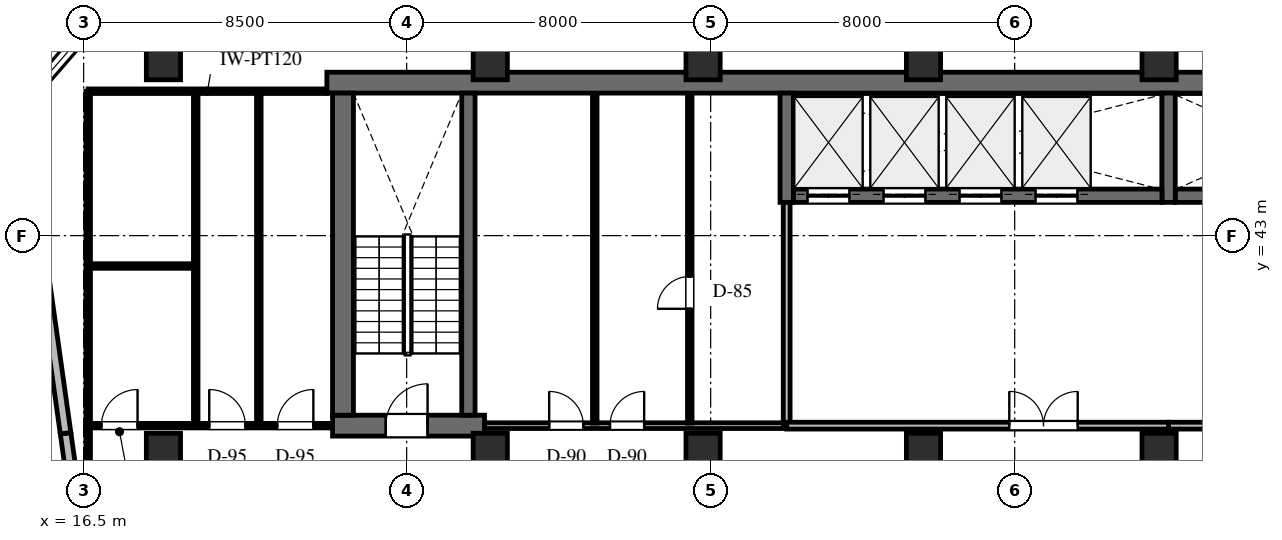
"""IFC4 building model, lengths in metres.
Left out: names, types, materials, properties, quantities, classifications, styles, units other than length and angle.
Written with IfcOpenShell. Run it as: python <this file> out.ifc"""

import sys

from ifc_helpers import new_model, si_unit, direction, frame, frame_2d, origin, origin_2d, place, context, subcontext, project, spatial, rectangle, extrude, element, fill, save


model = new_model("IFC4")
c1 = context("Model", 3, precision=1e-05, world=origin(), true_north=direction((0.0, 1.0)))
c2 = subcontext(c1, "Body", "Model", "MODEL_VIEW")
j1 = project(units=[si_unit("LENGTHUNIT", "METRE"), si_unit("PLANEANGLEUNIT", "RADIAN")], contexts=[c1])
p1 = place(None, origin())
s1 = spatial("IfcSite", under=j1, at=p1, CompositionType="ELEMENT")
p2 = place(p1, origin())
s2 = spatial("IfcBuilding", under=s1, at=p2, CompositionType="ELEMENT")
p3 = place(p2, frame((0.0, 0.0, 192.5)))
s3 = spatial("IfcBuildingStorey", under=s2, at=p3, CompositionType="ELEMENT", Elevation=192.5)
p4 = place(p3, frame((22.9, 47.025, 0.0), z_axis=(0.0, 0.0, 1.0), x_axis=(1.0, 0.0, 0.0)))
e1 = element("IfcWall", 1, at=p4, inside=s3, PredefinedType="SHEAR", context=c2, shape_type="SweptSolid", body=[
    extrude(rectangle(XDim=43.5, YDim=0.55, at=frame_2d((21.75, 0.0))), origin(), (0.0, 0.0, 1.0), 4.0),
])
p5 = place(p3, frame((45.225, 44.05, 0.0), z_axis=(0.0, 0.0, 1.0), x_axis=(1.0, 0.0, 0.0)))
e2 = element("IfcWall", 2, at=p5, inside=s3, PredefinedType="SHEAR", context=c2, shape_type="SweptSolid", body=[
    extrude(rectangle(XDim=5.65, YDim=0.35, at=frame_2d((2.825, 0.0))), origin(), (0.0, 0.0, 1.0), 4.0),
])
p6 = place(p3, frame((45.05, 43.875, 0.0), z_axis=(0.0, 0.0, 1.0), x_axis=(0.0, 1.0, 0.0)))
e3 = element("IfcWall", 3, at=p6, inside=s3, PredefinedType="SHEAR", context=c2, shape_type="SweptSolid", body=[
    extrude(rectangle(XDim=2.875, YDim=0.35, at=frame_2d((1.438, 0.0))), origin(), (0.0, 0.0, 1.0), 4.0),
])
p7 = place(p3, frame((35.175, 44.05, 0.0), z_axis=(0.0, 0.0, 1.0), x_axis=(1.0, 0.0, 0.0)))
e4 = element("IfcWall", 4, at=p7, inside=s3, PredefinedType="SHEAR", context=c2, shape_type="SweptSolid", body=[
    extrude(rectangle(XDim=9.7, YDim=0.35, at=frame_2d((4.85, 0.0))), origin(), (0.0, 0.0, 1.0), 4.0),
])
p8 = place(p7, frame((0.375, 0.0, 0.0)))
e5 = element("IfcOpeningElement", 5, at=p8, cuts=e4, PredefinedType="OPENING", context=c2, shape_type="SweptSolid", body=[
    extrude(rectangle(XDim=1.1, YDim=2.2, at=frame_2d((0.55, 1.1))), frame((0.0, 0.185, 0.0), z_axis=(0.0, -1.0, 0.0), x_axis=(1.0, 0.0, 0.0)), (0.0, 0.0, 1.0), 0.37),
])
p9 = place(p7, frame((2.375, 0.0, 0.0)))
e6 = element("IfcOpeningElement", 6, at=p9, cuts=e4, PredefinedType="OPENING", context=c2, shape_type="SweptSolid", body=[
    extrude(rectangle(XDim=1.1, YDim=2.2, at=frame_2d((0.55, 1.1))), frame((0.0, 0.185, 0.0), z_axis=(0.0, -1.0, 0.0), x_axis=(1.0, 0.0, 0.0)), (0.0, 0.0, 1.0), 0.37),
])
p10 = place(p7, frame((4.375, 0.0, 0.0)))
e7 = element("IfcOpeningElement", 7, at=p10, cuts=e4, PredefinedType="OPENING", context=c2, shape_type="SweptSolid", body=[
    extrude(rectangle(XDim=1.1, YDim=2.2, at=frame_2d((0.55, 1.1))), frame((0.0, 0.185, 0.0), z_axis=(0.0, -1.0, 0.0), x_axis=(1.0, 0.0, 0.0)), (0.0, 0.0, 1.0), 0.37),
])
p11 = place(p7, frame((6.375, 0.0, 0.0)))
e8 = element("IfcOpeningElement", 8, at=p11, cuts=e4, PredefinedType="OPENING", context=c2, shape_type="SweptSolid", body=[
    extrude(rectangle(XDim=1.1, YDim=2.2, at=frame_2d((0.55, 1.1))), frame((0.0, 0.185, 0.0), z_axis=(0.0, -1.0, 0.0), x_axis=(1.0, 0.0, 0.0)), (0.0, 0.0, 1.0), 0.37),
])
p12 = place(p3, frame((35.0, 43.875, 0.0), z_axis=(0.0, 0.0, 1.0), x_axis=(0.0, 1.0, 0.0)))
e9 = element("IfcWall", 9, at=p12, inside=s3, PredefinedType="SHEAR", context=c2, shape_type="SweptSolid", body=[
    extrude(rectangle(XDim=2.875, YDim=0.35, at=frame_2d((1.438, 0.0))), origin(), (0.0, 0.0, 1.0), 4.0),
])
p13 = place(p3, frame((23.05, 38.0, 0.0), z_axis=(0.0, 0.0, 1.0), x_axis=(1.0, 0.0, 0.0)))
e10 = element("IfcWall", 10, at=p13, inside=s3, PredefinedType="SHEAR", context=c2, shape_type="SweptSolid", body=[
    extrude(rectangle(XDim=4.0, YDim=0.55, at=frame_2d((2.0, 0.0))), origin(), (0.0, 0.0, 1.0), 4.0),
])
p14 = place(p13, frame((1.4, 0.0, 0.0)))
e11 = element("IfcOpeningElement", 11, at=p14, cuts=e10, PredefinedType="OPENING", context=c2, shape_type="SweptSolid", body=[
    extrude(rectangle(XDim=1.1, YDim=2.2, at=frame_2d((0.55, 1.1))), frame((0.0, 0.285, 0.0), z_axis=(0.0, -1.0, 0.0), x_axis=(1.0, 0.0, 0.0)), (0.0, 0.0, 1.0), 0.57),
])
p15 = place(p3, frame((23.325, 38.275, 0.0), z_axis=(0.0, 0.0, 1.0), x_axis=(0.0, 1.0, 0.0)))
e12 = element("IfcWall", 12, at=p15, inside=s3, PredefinedType="SHEAR", context=c2, shape_type="SweptSolid", body=[
    extrude(rectangle(XDim=8.475, YDim=0.55, at=frame_2d((4.238, 0.0))), origin(), (0.0, 0.0, 1.0), 4.0),
])
p16 = place(p3, frame((26.625, 38.275, 0.0), z_axis=(0.0, 0.0, 1.0), x_axis=(0.0, 1.0, 0.0)))
e13 = element("IfcWall", 13, at=p16, inside=s3, PredefinedType="SHEAR", context=c2, shape_type="SweptSolid", body=[
    extrude(rectangle(XDim=8.475, YDim=0.35, at=frame_2d((4.238, 0.0))), origin(), (0.0, 0.0, 1.0), 4.0),
])
for number, where, z_axis, x_axis in (
    (14, (44.8, 37.35, 0.0), (0.0, 0.0, 1.0), (1.0, 0.0, 0.0)),
    (15, (44.8, 47.55, 0.0), (0.0, 0.0, 1.0), (1.0, 0.0, 0.0)),
    (16, (38.6, 37.35, 0.0), (0.0, 0.0, 1.0), (1.0, 0.0, 0.0)),
    (17, (38.6, 47.55, 0.0), (0.0, 0.0, 1.0), (1.0, 0.0, 0.0)),
    (18, (32.8, 37.35, 0.0), (0.0, 0.0, 1.0), (1.0, 0.0, 0.0)),
    (19, (32.8, 47.55, 0.0), (0.0, 0.0, 1.0), (1.0, 0.0, 0.0)),
    (20, (27.2, 37.35, 0.0), (0.0, 0.0, 1.0), (1.0, 0.0, 0.0)),
    (21, (27.2, 47.55, 0.0), (0.0, 0.0, 1.0), (1.0, 0.0, 0.0)),
    (22, (18.6, 37.35, 0.0), (0.0, 0.0, 1.0), (1.0, 0.0, 0.0)),
    (23, (18.6, 47.55, 0.0), (0.0, 0.0, 1.0), (1.0, 0.0, 0.0)),
):
    element("IfcColumn", number, at=place(p3, frame(where, z_axis=z_axis, x_axis=x_axis)), inside=s3, PredefinedType="COLUMN", context=c2, shape_type="SweptSolid", body=[
        extrude(rectangle(XDim=0.9, YDim=0.9, at=origin_2d()), origin(), (0.0, 0.0, 1.0), 4.0),
    ])
p17 = place(p3, frame((19.434, 13.541, 0.0), z_axis=(0.0, 0.0, 1.0), x_axis=(-0.139173290738, 0.99026804207, 0.0)))
e24 = element("IfcWall", 24, at=p17, inside=s3, PredefinedType="STANDARD", context=c2, shape_type="SweptSolid", body=[
    extrude(rectangle(XDim=24.498, YDim=0.28, at=frame_2d((12.249, 0.0))), origin(), (0.0, 0.0, 1.0), 3.755),
])
p18 = place(p17, frame((15.668, 0.0, 0.0)))
e25 = element("IfcOpeningElement", 25, at=p18, cuts=e24, PredefinedType="OPENING", context=c2, shape_type="SweptSolid", body=[
    extrude(rectangle(XDim=1.0, YDim=2.15, at=frame_2d((0.5, 1.075))), frame((0.0, 0.15, 0.0), z_axis=(0.0, -1.0, 0.0), x_axis=(1.0, 0.0, 0.0)), (0.0, 0.0, 1.0), 0.3),
])
p19 = place(p17, frame((6.885, 0.0, 0.65)))
e26 = element("IfcOpeningElement", 26, at=p19, cuts=e24, PredefinedType="OPENING", context=c2, shape_type="SweptSolid", body=[
    extrude(rectangle(XDim=1.8, YDim=2.1, at=frame_2d((0.9, 1.05))), frame((0.0, 0.15, 0.0), z_axis=(0.0, -1.0, 0.0), x_axis=(1.0, 0.0, 0.0)), (0.0, 0.0, 1.0), 0.3),
])
p20 = place(p17, frame((18.708, 0.0, 0.65)))
e27 = element("IfcOpeningElement", 27, at=p20, cuts=e24, PredefinedType="OPENING", context=c2, shape_type="SweptSolid", body=[
    extrude(rectangle(XDim=1.8, YDim=2.1, at=frame_2d((0.9, 1.05))), frame((0.0, 0.15, 0.0), z_axis=(0.0, -1.0, 0.0), x_axis=(1.0, 0.0, 0.0)), (0.0, 0.0, 1.0), 0.3),
])
p21 = place(p3, frame((16.025, 37.8, 0.0), z_axis=(0.0, 0.0, 1.0), x_axis=(-0.13918102754, 0.990266954701, 0.0)))
e28 = element("IfcWall", 28, at=p21, inside=s3, PredefinedType="STANDARD", context=c2, shape_type="SweptSolid", body=[
    extrude(rectangle(XDim=8.667, YDim=0.28, at=frame_2d((4.333, 0.0))), origin(), (0.0, 0.0, 1.0), 3.755),
])
p22 = place(p21, frame((3.374, 0.0, 0.65)))
e29 = element("IfcOpeningElement", 29, at=p22, cuts=e28, PredefinedType="OPENING", context=c2, shape_type="SweptSolid", body=[
    extrude(rectangle(XDim=1.8, YDim=2.1, at=frame_2d((0.9, 1.05))), frame((0.0, 0.15, 0.0), z_axis=(0.0, -1.0, 0.0), x_axis=(1.0, 0.0, 0.0)), (0.0, 0.0, 1.0), 0.3),
])
p23 = place(p3, frame((14.819, 46.383, 0.0), z_axis=(0.0, 0.0, 1.0), x_axis=(0.656071351282, 0.754698868442, 0.0)))
e30 = element("IfcWall", 30, at=p23, inside=s3, PredefinedType="STANDARD", context=c2, shape_type="SweptSolid", body=[
    extrude(rectangle(XDim=2.646, YDim=0.28, at=frame_2d((1.323, 0.0))), origin(), (0.0, 0.0, 1.0), 3.755),
])
p24 = place(p23, frame((0.416, 0.0, 0.65)))
e31 = element("IfcOpeningElement", 31, at=p24, cuts=e30, PredefinedType="OPENING", context=c2, shape_type="SweptSolid", body=[
    extrude(rectangle(XDim=1.8, YDim=2.1, at=frame_2d((0.9, 1.05))), frame((0.0, 0.15, 0.0), z_axis=(0.0, -1.0, 0.0), x_axis=(1.0, 0.0, 0.0)), (0.0, 0.0, 1.0), 0.3),
])
p25 = place(p3, frame((45.05, 38.0, 0.0), z_axis=(0.0, 0.0, 1.0), x_axis=(1.0, 0.0, 0.0)))
e32 = element("IfcWall", 32, at=p25, inside=s3, PredefinedType="STANDARD", context=c2, shape_type="SweptSolid", body=[
    extrude(rectangle(XDim=5.75, YDim=0.18, at=frame_2d((2.875, 0.0))), origin(), (0.0, 0.0, 1.0), 2.982),
])
p26 = place(p25, frame((1.325, 0.0, 0.0)))
e33 = element("IfcOpeningElement", 33, at=p26, cuts=e32, PredefinedType="OPENING", context=c2, shape_type="SweptSolid", body=[
    extrude(rectangle(XDim=1.0, YDim=2.15, at=frame_2d((0.5, 1.075))), frame((0.0, 0.1, 0.0), z_axis=(0.0, -1.0, 0.0), x_axis=(1.0, 0.0, 0.0)), (0.0, 0.0, 1.0), 0.2),
])
p27 = place(p25, frame((3.275, 0.0, 0.0)))
e34 = element("IfcOpeningElement", 34, at=p27, cuts=e32, PredefinedType="OPENING", context=c2, shape_type="SweptSolid", body=[
    extrude(rectangle(XDim=1.0, YDim=2.15, at=frame_2d((0.5, 1.075))), frame((0.0, 0.1, 0.0), z_axis=(0.0, -1.0, 0.0), x_axis=(1.0, 0.0, 0.0)), (0.0, 0.0, 1.0), 0.2),
])
p28 = place(p3, frame((27.05, 38.0, 0.0), z_axis=(0.0, 0.0, 1.0), x_axis=(1.0, 0.0, 0.0)))
e35 = element("IfcWall", 35, at=p28, inside=s3, PredefinedType="PARTITIONING", context=c2, shape_type="SweptSolid", body=[
    extrude(rectangle(XDim=7.95, YDim=0.15, at=frame_2d((3.975, 0.0))), origin(), (0.0, 0.0, 1.0), 2.982),
])
p29 = place(p28, frame((1.7, 0.0, 0.0)))
e36 = element("IfcOpeningElement", 36, at=p29, cuts=e35, PredefinedType="OPENING", context=c2, shape_type="SweptSolid", body=[
    extrude(rectangle(XDim=0.9, YDim=2.1, at=frame_2d((0.45, 1.05))), frame((0.0, 0.085, 0.0), z_axis=(0.0, -1.0, 0.0), x_axis=(1.0, 0.0, 0.0)), (0.0, 0.0, 1.0), 0.17),
])
p30 = place(p28, frame((3.3, 0.0, 0.0)))
e37 = element("IfcOpeningElement", 37, at=p30, cuts=e35, PredefinedType="OPENING", context=c2, shape_type="SweptSolid", body=[
    extrude(rectangle(XDim=0.9, YDim=2.1, at=frame_2d((0.45, 1.05))), frame((0.0, 0.085, 0.0), z_axis=(0.0, -1.0, 0.0), x_axis=(1.0, 0.0, 0.0)), (0.0, 0.0, 1.0), 0.17),
])
p31 = place(p3, frame((35.0, 38.0, 0.0), z_axis=(0.0, 0.0, 1.0), x_axis=(0.0, 1.0, 0.0)))
e38 = element("IfcWall", 38, at=p31, inside=s3, PredefinedType="STANDARD", context=c2, shape_type="SweptSolid", body=[
    extrude(rectangle(XDim=5.875, YDim=0.18, at=frame_2d((2.938, 0.0))), origin(), (0.0, 0.0, 1.0), 3.755),
])
p32 = place(p3, frame((29.95, 38.068, 0.0), z_axis=(0.0, 0.0, 1.0), x_axis=(0.0, 1.0, 0.0)))
e39 = element("IfcWall", 39, at=p32, inside=s3, PredefinedType="PARTITIONING", context=c2, shape_type="SweptSolid", body=[
    extrude(rectangle(XDim=8.674, YDim=0.12, at=frame_2d((4.337, 0.0))), origin(), (0.0, 0.0, 1.0), 3.755),
])
p33 = place(p3, frame((32.45, 38.068, 0.0), z_axis=(0.0, 0.0, 1.0), x_axis=(0.0, 1.0, 0.0)))
e40 = element("IfcWall", 40, at=p33, inside=s3, PredefinedType="PARTITIONING", context=c2, shape_type="SweptSolid", body=[
    extrude(rectangle(XDim=8.674, YDim=0.12, at=frame_2d((4.337, 0.0))), origin(), (0.0, 0.0, 1.0), 3.755),
])
p34 = place(p33, frame((3.007, 0.0, 0.0)))
e41 = element("IfcOpeningElement", 41, at=p34, cuts=e40, PredefinedType="OPENING", context=c2, shape_type="SweptSolid", body=[
    extrude(rectangle(XDim=0.85, YDim=2.1, at=frame_2d((0.425, 1.05))), frame((0.0, 0.07, 0.0), z_axis=(0.0, -1.0, 0.0), x_axis=(1.0, 0.0, 0.0)), (0.0, 0.0, 1.0), 0.14),
])
p35 = place(p3, frame((35.0, 38.0, 0.0), z_axis=(0.0, 0.0, 1.0), x_axis=(1.0, 0.0, 0.0)))
e42 = element("IfcWall", 42, at=p35, inside=s3, PredefinedType="STANDARD", context=c2, shape_type="SweptSolid", body=[
    extrude(rectangle(XDim=10.05, YDim=0.18, at=frame_2d((5.025, 0.0))), origin(), (0.0, 0.0, 1.0), 2.982),
])
p36 = place(p35, frame((5.858, 0.0, 0.0)))
e43 = element("IfcOpeningElement", 43, at=p36, cuts=e42, PredefinedType="OPENING", context=c2, shape_type="SweptSolid", body=[
    extrude(rectangle(XDim=1.8, YDim=2.2, at=frame_2d((0.9, 1.1))), frame((0.0, 0.1, 0.0), z_axis=(0.0, -1.0, 0.0), x_axis=(1.0, 0.0, 0.0)), (0.0, 0.0, 1.0), 0.2),
])
p37 = place(p3, frame((16.62, 38.0, 0.0), z_axis=(0.0, 0.0, 1.0), x_axis=(1.0, 0.0, 0.0)))
e44 = element("IfcWall", 44, at=p37, inside=s3, PredefinedType="PARTITIONING", context=c2, shape_type="SweptSolid", body=[
    extrude(rectangle(XDim=6.43, YDim=0.12, at=frame_2d((3.215, 0.0))), origin(), (0.0, 0.0, 1.0), 2.982),
])
p38 = place(p37, frame((0.349, 0.0, 0.0)))
e45 = element("IfcOpeningElement", 45, at=p38, cuts=e44, PredefinedType="OPENING", context=c2, shape_type="SweptSolid", body=[
    extrude(rectangle(XDim=0.95, YDim=2.15, at=frame_2d((0.475, 1.075))), frame((0.0, 0.07, 0.0), z_axis=(0.0, -1.0, 0.0), x_axis=(1.0, 0.0, 0.0)), (0.0, 0.0, 1.0), 0.14),
])
p39 = place(p37, frame((3.185, 0.0, 0.0)))
e46 = element("IfcOpeningElement", 46, at=p39, cuts=e44, PredefinedType="OPENING", context=c2, shape_type="SweptSolid", body=[
    extrude(rectangle(XDim=0.95, YDim=2.15, at=frame_2d((0.475, 1.075))), frame((0.0, 0.07, 0.0), z_axis=(0.0, -1.0, 0.0), x_axis=(1.0, 0.0, 0.0)), (0.0, 0.0, 1.0), 0.14),
])
p40 = place(p37, frame((4.975, 0.0, 0.0)))
e47 = element("IfcOpeningElement", 47, at=p40, cuts=e44, PredefinedType="OPENING", context=c2, shape_type="SweptSolid", body=[
    extrude(rectangle(XDim=0.95, YDim=2.15, at=frame_2d((0.475, 1.075))), frame((0.0, 0.07, 0.0), z_axis=(0.0, -1.0, 0.0), x_axis=(1.0, 0.0, 0.0)), (0.0, 0.0, 1.0), 0.14),
])
p41 = place(p3, frame((16.62, 38.0, 0.0), z_axis=(0.0, 0.0, 1.0), x_axis=(0.0, 1.0, 0.0)))
e48 = element("IfcWall", 48, at=p41, inside=s3, PredefinedType="PARTITIONING", context=c2, shape_type="SweptSolid", body=[
    extrude(rectangle(XDim=8.8, YDim=0.12, at=frame_2d((4.4, 0.0))), origin(), (0.0, 0.0, 1.0), 3.755),
])
p42 = place(p3, frame((16.62, 46.8, 0.0), z_axis=(0.0, 0.0, 1.0), x_axis=(1.0, 0.0, 0.0)))
e49 = element("IfcWall", 49, at=p42, inside=s3, PredefinedType="PARTITIONING", context=c2, shape_type="SweptSolid", body=[
    extrude(rectangle(XDim=6.28, YDim=0.12, at=frame_2d((3.14, 0.0))), origin(), (0.0, 0.0, 1.0), 2.982),
])
for number, where, z_axis, x_axis in (
    (50, (19.45, 38.068, 0.0), (0.0, 0.0, 1.0), (0.0, 1.0, 0.0)),
    (51, (21.11, 38.068, 0.0), (0.0, 0.0, 1.0), (0.0, 1.0, 0.0)),
):
    element("IfcWall", number, at=place(p3, frame(where, z_axis=z_axis, x_axis=x_axis)), inside=s3, PredefinedType="PARTITIONING", context=c2, shape_type="SweptSolid", body=[
        extrude(rectangle(XDim=8.664, YDim=0.12, at=frame_2d((4.332, 0.0))), origin(), (0.0, 0.0, 1.0), 3.755),
    ])
p43 = place(p3, frame((16.688, 42.2, 0.0), z_axis=(0.0, 0.0, 1.0), x_axis=(1.0, 0.0, 0.0)))
e52 = element("IfcWall", 52, at=p43, inside=s3, PredefinedType="PARTITIONING", context=c2, shape_type="SweptSolid", body=[
    extrude(rectangle(XDim=2.694, YDim=0.12, at=frame_2d((1.347, 0.0))), origin(), (0.0, 0.0, 1.0), 2.982),
])
p44 = place(p3, frame((16.62, 34.752, 0.0), z_axis=(0.0, 0.0, 1.0), x_axis=(0.0, 1.0, 0.0)))
e53 = element("IfcWall", 53, at=p44, inside=s3, PredefinedType="PARTITIONING", context=c2, shape_type="SweptSolid", body=[
    extrude(rectangle(XDim=3.298, YDim=0.12, at=frame_2d((1.649, 0.0))), origin(), (0.0, 0.0, 1.0), 3.755),
])
p45 = place(p24, origin())
e54 = element("IfcWindow", 54, at=p45, inside=s3, PartitioningType="SINGLE_PANEL", PredefinedType="WINDOW", context=c2, shape_type="SweptSolid", body=[
    extrude(rectangle(XDim=1.8, YDim=2.1, at=frame_2d((0.9, 1.05))), frame((0.0, 0.03, 0.0), z_axis=(0.0, -1.0, 0.0), x_axis=(1.0, 0.0, 0.0)), (0.0, 0.0, 1.0), 0.06),
])
fill(e31, e54)
p46 = place(p14, origin())
e55 = element("IfcDoor", 55, at=p46, inside=s3, OperationType="SINGLE_SWING_RIGHT", PredefinedType="DOOR", context=c2, shape_type="SweptSolid", body=[
    extrude(rectangle(XDim=1.1, YDim=2.2, at=frame_2d((0.55, 1.1))), frame((0.0, 0.025, 0.0), z_axis=(0.0, -1.0, 0.0), x_axis=(1.0, 0.0, 0.0)), (0.0, 0.0, 1.0), 0.05),
])
fill(e11, e55)
p47 = place(p8, origin())
e56 = element("IfcDoor", 56, at=p47, inside=s3, OperationType="DOUBLE_DOOR_SLIDING", PredefinedType="DOOR", context=c2, shape_type="SweptSolid", body=[
    extrude(rectangle(XDim=1.1, YDim=2.2, at=frame_2d((0.55, 1.1))), frame((0.0, 0.025, 0.0), z_axis=(0.0, -1.0, 0.0), x_axis=(1.0, 0.0, 0.0)), (0.0, 0.0, 1.0), 0.05),
])
fill(e5, e56)
p48 = place(p9, origin())
e57 = element("IfcDoor", 57, at=p48, inside=s3, OperationType="DOUBLE_DOOR_SLIDING", PredefinedType="DOOR", context=c2, shape_type="SweptSolid", body=[
    extrude(rectangle(XDim=1.1, YDim=2.2, at=frame_2d((0.55, 1.1))), frame((0.0, 0.025, 0.0), z_axis=(0.0, -1.0, 0.0), x_axis=(1.0, 0.0, 0.0)), (0.0, 0.0, 1.0), 0.05),
])
fill(e6, e57)
p49 = place(p10, origin())
e58 = element("IfcDoor", 58, at=p49, inside=s3, OperationType="DOUBLE_DOOR_SLIDING", PredefinedType="DOOR", context=c2, shape_type="SweptSolid", body=[
    extrude(rectangle(XDim=1.1, YDim=2.2, at=frame_2d((0.55, 1.1))), frame((0.0, 0.025, 0.0), z_axis=(0.0, -1.0, 0.0), x_axis=(1.0, 0.0, 0.0)), (0.0, 0.0, 1.0), 0.05),
])
fill(e7, e58)
p50 = place(p11, origin())
e59 = element("IfcDoor", 59, at=p50, inside=s3, OperationType="DOUBLE_DOOR_SLIDING", PredefinedType="DOOR", context=c2, shape_type="SweptSolid", body=[
    extrude(rectangle(XDim=1.1, YDim=2.2, at=frame_2d((0.55, 1.1))), frame((0.0, 0.025, 0.0), z_axis=(0.0, -1.0, 0.0), x_axis=(1.0, 0.0, 0.0)), (0.0, 0.0, 1.0), 0.05),
])
fill(e8, e59)
p51 = place(p29, origin())
e60 = element("IfcDoor", 60, at=p51, inside=s3, OperationType="SINGLE_SWING_LEFT", PredefinedType="DOOR", context=c2, shape_type="SweptSolid", body=[
    extrude(rectangle(XDim=0.9, YDim=2.1, at=frame_2d((0.45, 1.05))), frame((0.0, 0.025, 0.0), z_axis=(0.0, -1.0, 0.0), x_axis=(1.0, 0.0, 0.0)), (0.0, 0.0, 1.0), 0.05),
])
fill(e36, e60)
p52 = place(p30, origin())
e61 = element("IfcDoor", 61, at=p52, inside=s3, OperationType="SINGLE_SWING_RIGHT", PredefinedType="DOOR", context=c2, shape_type="SweptSolid", body=[
    extrude(rectangle(XDim=0.9, YDim=2.1, at=frame_2d((0.45, 1.05))), frame((0.0, 0.025, 0.0), z_axis=(0.0, -1.0, 0.0), x_axis=(1.0, 0.0, 0.0)), (0.0, 0.0, 1.0), 0.05),
])
fill(e37, e61)
p53 = place(p34, origin())
e62 = element("IfcDoor", 62, at=p53, inside=s3, OperationType="SINGLE_SWING_LEFT", PredefinedType="DOOR", context=c2, shape_type="SweptSolid", body=[
    extrude(rectangle(XDim=0.85, YDim=2.1, at=frame_2d((0.425, 1.05))), frame((0.0, 0.025, 0.0), z_axis=(0.0, -1.0, 0.0), x_axis=(1.0, 0.0, 0.0)), (0.0, 0.0, 1.0), 0.05),
])
fill(e41, e62)
p54 = place(p36, origin())
e63 = element("IfcDoor", 63, at=p54, inside=s3, OperationType="DOUBLE_DOOR_SINGLE_SWING", PredefinedType="DOOR", context=c2, shape_type="SweptSolid", body=[
    extrude(rectangle(XDim=1.8, YDim=2.2, at=frame_2d((0.9, 1.1))), frame((0.0, 0.025, 0.0), z_axis=(0.0, -1.0, 0.0), x_axis=(1.0, 0.0, 0.0)), (0.0, 0.0, 1.0), 0.05),
])
fill(e43, e63)
p55 = place(p38, origin())
e64 = element("IfcDoor", 64, at=p55, inside=s3, OperationType="SINGLE_SWING_RIGHT", PredefinedType="DOOR", context=c2, shape_type="SweptSolid", body=[
    extrude(rectangle(XDim=0.95, YDim=2.15, at=frame_2d((0.475, 1.075))), frame((0.0, 0.025, 0.0), z_axis=(0.0, -1.0, 0.0), x_axis=(1.0, 0.0, 0.0)), (0.0, 0.0, 1.0), 0.05),
])
fill(e45, e64)
p56 = place(p39, origin())
e65 = element("IfcDoor", 65, at=p56, inside=s3, OperationType="SINGLE_SWING_LEFT", PredefinedType="DOOR", context=c2, shape_type="SweptSolid", body=[
    extrude(rectangle(XDim=0.95, YDim=2.15, at=frame_2d((0.475, 1.075))), frame((0.0, 0.025, 0.0), z_axis=(0.0, -1.0, 0.0), x_axis=(1.0, 0.0, 0.0)), (0.0, 0.0, 1.0), 0.05),
])
fill(e46, e65)
p57 = place(p40, origin())
e66 = element("IfcDoor", 66, at=p57, inside=s3, OperationType="SINGLE_SWING_RIGHT", PredefinedType="DOOR", context=c2, shape_type="SweptSolid", body=[
    extrude(rectangle(XDim=0.95, YDim=2.15, at=frame_2d((0.475, 1.075))), frame((0.0, 0.025, 0.0), z_axis=(0.0, -1.0, 0.0), x_axis=(1.0, 0.0, 0.0)), (0.0, 0.0, 1.0), 0.05),
])
fill(e47, e66)
save(model, sys.argv[1])
